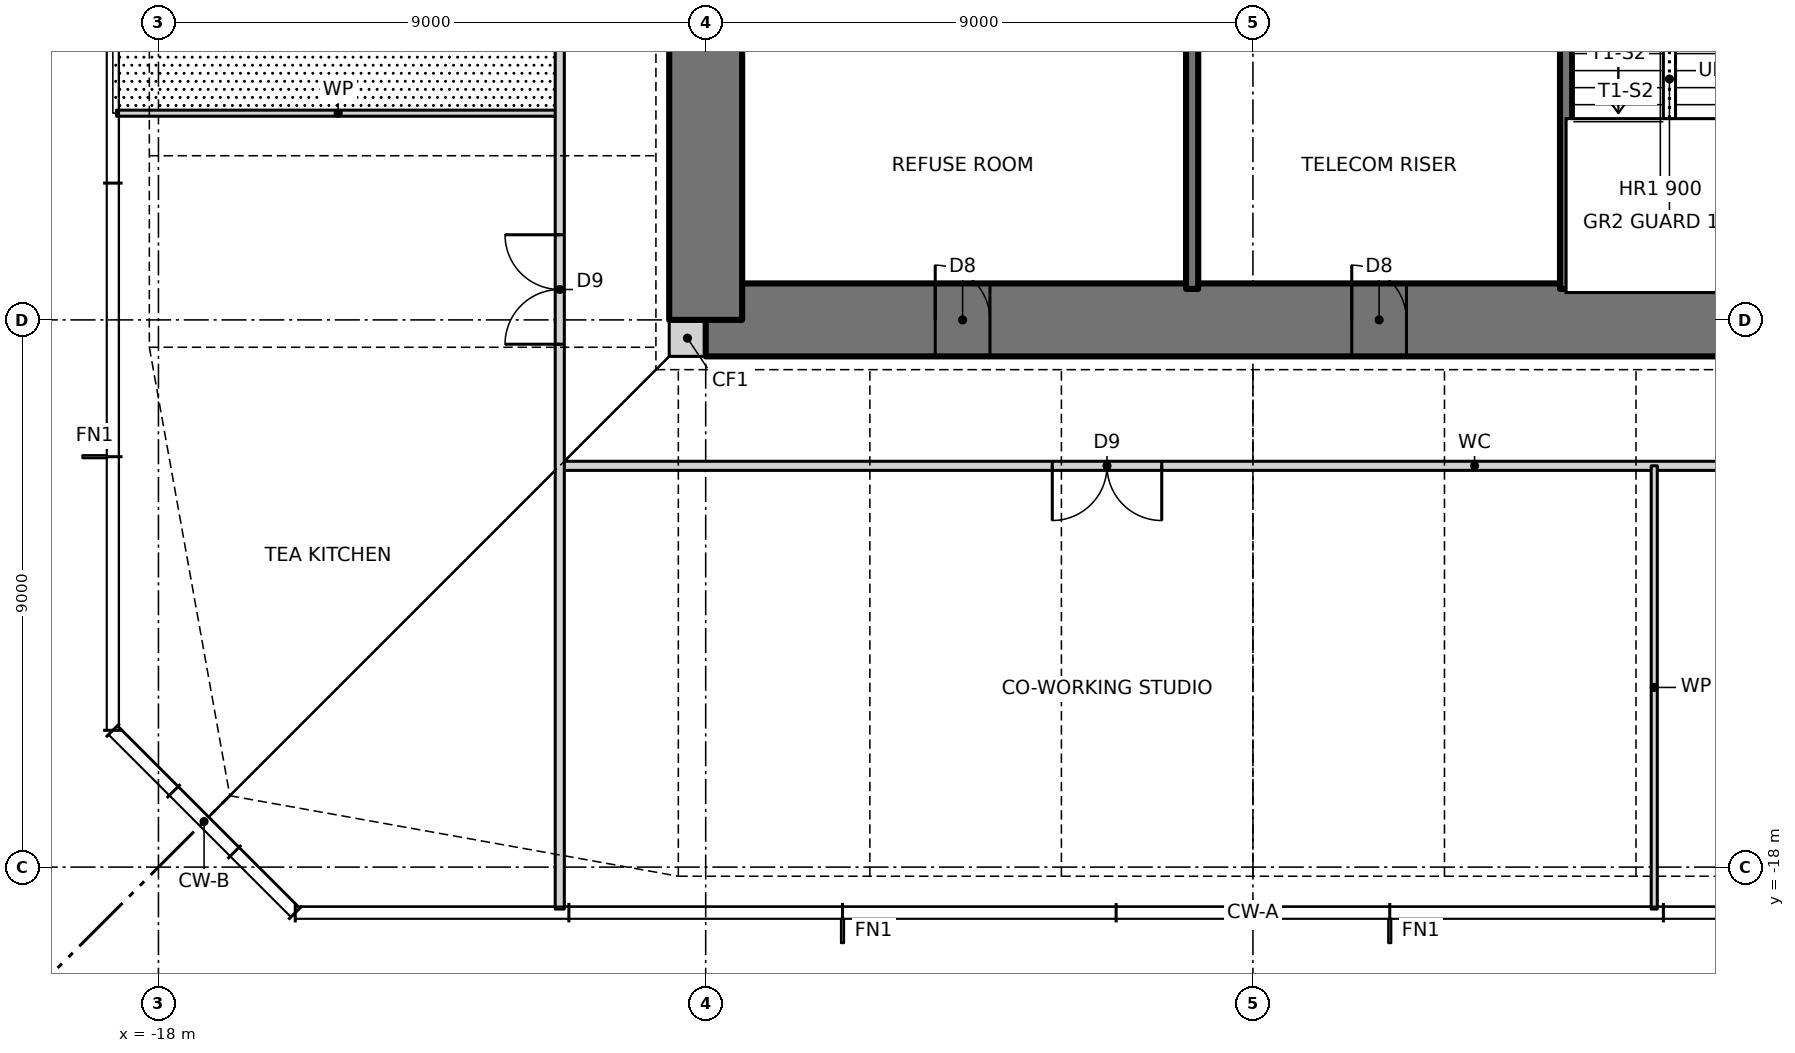
"""IFC4 building model, lengths in metres.
Left out: names, types, materials, properties, quantities, classifications, styles, units other than length and angle.
Written with IfcOpenShell. Run it as: python <this file> out.ifc"""

import sys

from ifc_helpers import new_model, si_unit, direction, frame, frame_2d, origin, place, context, subcontext, project, spatial, rectangle, extrude, element, fill, save


model = new_model("IFC4")
c1 = context("Model", 3, precision=1e-05, world=origin(), true_north=direction((0.0, 1.0)))
c2 = subcontext(c1, "Body", "Model", "MODEL_VIEW")
j1 = project(units=[si_unit("LENGTHUNIT", "METRE"), si_unit("PLANEANGLEUNIT", "RADIAN")], contexts=[c1])
p1 = place(None, origin())
s1 = spatial("IfcSite", under=j1, at=p1, CompositionType="ELEMENT")
p2 = place(p1, origin())
s2 = spatial("IfcBuilding", under=s1, at=p2, CompositionType="ELEMENT")
p3 = place(p2, frame((0.0, 0.0, 149.5)))
s3 = spatial("IfcBuildingStorey", under=s2, at=p3, CompositionType="ELEMENT", Elevation=149.5)
p4 = place(p3, frame((-9.6, -9.3, 0.0), z_axis=(0.0, 0.0, 1.0), x_axis=(1.0, 0.0, 0.0)))
e1 = element("IfcWall", 1, at=p4, inside=s3, PredefinedType="SOLIDWALL", context=c2, shape_type="SweptSolid", body=[
    extrude(rectangle(XDim=0.6, YDim=0.6, at=frame_2d((0.3, 0.0))), origin(), (0.0, 0.0, 1.0), 3.5),
])
p5 = place(p3, frame((-9.0, -9.0, 0.0), z_axis=(0.0, 0.0, 1.0), x_axis=(1.0, 0.0, 0.0)))
e2 = element("IfcWall", 2, at=p5, inside=s3, PredefinedType="SHEAR", context=c2, shape_type="SweptSolid", body=[
    extrude(rectangle(XDim=18.0, YDim=1.2, at=frame_2d((9.0, 0.0))), origin(), (0.0, 0.0, 1.0), 3.5),
])
p6 = place(p5, frame((3.775, 0.0, 0.0)))
e3 = element("IfcOpeningElement", 3, at=p6, cuts=e2, PredefinedType="OPENING", context=c2, shape_type="SweptSolid", body=[
    extrude(rectangle(XDim=0.9, YDim=2.1, at=frame_2d((0.45, 1.05))), frame((0.0, 0.61, 0.0), z_axis=(0.0, -1.0, 0.0), x_axis=(1.0, 0.0, 0.0)), (0.0, 0.0, 1.0), 1.22),
])
p7 = place(p5, frame((10.625, 0.0, 0.0)))
e4 = element("IfcOpeningElement", 4, at=p7, cuts=e2, PredefinedType="OPENING", context=c2, shape_type="SweptSolid", body=[
    extrude(rectangle(XDim=0.9, YDim=2.1, at=frame_2d((0.45, 1.05))), frame((0.0, 0.61, 0.0), z_axis=(0.0, -1.0, 0.0), x_axis=(1.0, 0.0, 0.0)), (0.0, 0.0, 1.0), 1.22),
])
p8 = place(p3, frame((-9.0, 9.0, 0.0), z_axis=(0.0, 0.0, 1.0), x_axis=(0.0, -1.0, 0.0)))
e5 = element("IfcWall", 5, at=p8, inside=s3, PredefinedType="SHEAR", context=c2, shape_type="SweptSolid", body=[
    extrude(rectangle(XDim=18.0, YDim=1.2, at=frame_2d((9.0, 0.0))), origin(), (0.0, 0.0, 1.0), 3.5),
])
p9 = place(p8, frame((8.5, 0.0, 0.0)))
e6 = element("IfcOpeningElement", 6, at=p9, cuts=e5, PredefinedType="OPENING", context=c2, shape_type="SweptSolid", body=[
    extrude(rectangle(XDim=1.0, YDim=2.1, at=frame_2d((0.5, 1.05))), frame((0.0, 0.61, 0.0), z_axis=(0.0, -1.0, 0.0), x_axis=(1.0, 0.0, 0.0)), (0.0, 0.0, 1.0), 1.22),
])
p10 = place(p3, frame((-11.4, -11.4, 0.0), z_axis=(0.0, 0.0, 1.0), x_axis=(1.0, 0.0, 0.0)))
e7 = element("IfcWall", 7, at=p10, inside=s3, PredefinedType="PARTITIONING", context=c2, shape_type="SweptSolid", body=[
    extrude(rectangle(XDim=30.09, YDim=0.15, at=frame_2d((15.045, 0.0))), origin(), (0.0, 0.0, 1.0), 3.27),
])
p11 = place(p10, frame((8.1, 0.0, 0.0)))
e8 = element("IfcOpeningElement", 8, at=p11, cuts=e7, PredefinedType="OPENING", context=c2, shape_type="SweptSolid", body=[
    extrude(rectangle(XDim=1.8, YDim=2.1, at=frame_2d((0.9, 1.05))), frame((0.0, 0.085, 0.0), z_axis=(0.0, -1.0, 0.0), x_axis=(1.0, 0.0, 0.0)), (0.0, 0.0, 1.0), 0.17),
])
p12 = place(p10, frame((19.5, 0.0, 0.0)))
e9 = element("IfcOpeningElement", 9, at=p12, cuts=e7, PredefinedType="OPENING", context=c2, shape_type="SweptSolid", body=[
    extrude(rectangle(XDim=1.8, YDim=2.1, at=frame_2d((0.9, 1.05))), frame((0.0, 0.085, 0.0), z_axis=(0.0, -1.0, 0.0), x_axis=(1.0, 0.0, 0.0)), (0.0, 0.0, 1.0), 0.17),
])
for number, where, z_axis, x_axis in (
    (10, (-18.69, -5.6, 0.0), (0.0, 0.0, 1.0), (1.0, 0.0, 0.0)),
    (11, (6.6, -18.69, 0.0), (0.0, 0.0, 1.0), (0.0, 1.0, 0.0)),
):
    element("IfcWall", number, at=place(p3, frame(where, z_axis=z_axis, x_axis=x_axis)), inside=s3, PredefinedType="PARTITIONING", context=c2, shape_type="SweptSolid", body=[
        extrude(rectangle(XDim=7.29, YDim=0.1, at=frame_2d((3.645, 0.0))), origin(), (0.0, 0.0, 1.0), 3.27),
    ])
p13 = place(p3, frame((5.15, -8.49, 0.0), z_axis=(0.0, 0.0, 1.0), x_axis=(0.0, 1.0, 0.0)))
e12 = element("IfcWall", 12, at=p13, inside=s3, PredefinedType="SOLIDWALL", context=c2, shape_type="SweptSolid", body=[
    extrude(rectangle(XDim=13.09, YDim=0.2, at=frame_2d((6.545, 0.0))), origin(), (0.0, 0.0, 1.0), 3.5),
])
p14 = place(p13, frame((7.89, 0.0, 0.0)))
e13 = element("IfcOpeningElement", 13, at=p14, cuts=e12, PredefinedType="OPENING", context=c2, shape_type="SweptSolid", body=[
    extrude(rectangle(XDim=1.2, YDim=2.1, at=frame_2d((0.6, 1.05))), frame((0.0, 0.11, 0.0), z_axis=(0.0, -1.0, 0.0), x_axis=(1.0, 0.0, 0.0)), (0.0, 0.0, 1.0), 0.22),
])
p15 = place(p3, frame((-1.0, -8.49, 0.0), z_axis=(0.0, 0.0, 1.0), x_axis=(0.0, 1.0, 0.0)))
e14 = element("IfcWall", 14, at=p15, inside=s3, PredefinedType="SOLIDWALL", context=c2, shape_type="SweptSolid", body=[
    extrude(rectangle(XDim=4.09, YDim=0.2, at=frame_2d((2.045, 0.0))), origin(), (0.0, 0.0, 1.0), 3.5),
])
p16 = place(p3, frame((-11.4, -18.69, 0.0), z_axis=(0.0, 0.0, 1.0), x_axis=(0.0, 1.0, 0.0)))
e15 = element("IfcWall", 15, at=p16, inside=s3, PredefinedType="PARTITIONING", context=c2, shape_type="SweptSolid", body=[
    extrude(rectangle(XDim=30.09, YDim=0.15, at=frame_2d((15.045, 0.0))), origin(), (0.0, 0.0, 1.0), 3.27),
])
p17 = place(p16, frame((20.69, 0.0, 0.0)))
e16 = element("IfcOpeningElement", 16, at=p17, cuts=e15, PredefinedType="OPENING", context=c2, shape_type="SweptSolid", body=[
    extrude(rectangle(XDim=1.8, YDim=2.1, at=frame_2d((0.9, 1.05))), frame((0.0, 0.085, 0.0), z_axis=(0.0, -1.0, 0.0), x_axis=(1.0, 0.0, 0.0)), (0.0, 0.0, 1.0), 0.17),
])
p18 = place(p16, frame((9.29, 0.0, 0.0)))
e17 = element("IfcOpeningElement", 17, at=p18, cuts=e15, PredefinedType="OPENING", context=c2, shape_type="SweptSolid", body=[
    extrude(rectangle(XDim=1.8, YDim=2.1, at=frame_2d((0.9, 1.05))), frame((0.0, 0.085, 0.0), z_axis=(0.0, -1.0, 0.0), x_axis=(1.0, 0.0, 0.0)), (0.0, 0.0, 1.0), 0.17),
])
p19 = place(p11, frame((1.8, 0.0, 0.0), z_axis=(0.0, 0.0, 1.0), x_axis=(-1.0, 0.0, 0.0)))
e18 = element("IfcDoor", 18, at=p19, inside=s3, OperationType="DOUBLE_DOOR_SINGLE_SWING", PredefinedType="DOOR", context=c2, shape_type="SweptSolid", body=[
    extrude(rectangle(XDim=1.8, YDim=2.1, at=frame_2d((0.9, 1.05))), frame((0.0, 0.025, 0.0), z_axis=(0.0, -1.0, 0.0), x_axis=(1.0, 0.0, 0.0)), (0.0, 0.0, 1.0), 0.05),
])
fill(e8, e18)
p20 = place(p18, origin())
e19 = element("IfcDoor", 19, at=p20, inside=s3, OperationType="DOUBLE_DOOR_SINGLE_SWING", PredefinedType="DOOR", context=c2, shape_type="SweptSolid", body=[
    extrude(rectangle(XDim=1.8, YDim=2.1, at=frame_2d((0.9, 1.05))), frame((0.0, 0.025, 0.0), z_axis=(0.0, -1.0, 0.0), x_axis=(1.0, 0.0, 0.0)), (0.0, 0.0, 1.0), 0.05),
])
fill(e17, e19)
p21 = place(p6, origin())
e20 = element("IfcDoor", 20, at=p21, inside=s3, OperationType="SINGLE_SWING_LEFT", PredefinedType="DOOR", context=c2, shape_type="SweptSolid", body=[
    extrude(rectangle(XDim=0.9, YDim=2.1, at=frame_2d((0.45, 1.05))), frame((0.0, 0.025, 0.0), z_axis=(0.0, -1.0, 0.0), x_axis=(1.0, 0.0, 0.0)), (0.0, 0.0, 1.0), 0.05),
])
fill(e3, e20)
p22 = place(p7, origin())
e21 = element("IfcDoor", 21, at=p22, inside=s3, OperationType="SINGLE_SWING_LEFT", PredefinedType="DOOR", context=c2, shape_type="SweptSolid", body=[
    extrude(rectangle(XDim=0.9, YDim=2.1, at=frame_2d((0.45, 1.05))), frame((0.0, 0.025, 0.0), z_axis=(0.0, -1.0, 0.0), x_axis=(1.0, 0.0, 0.0)), (0.0, 0.0, 1.0), 0.05),
])
fill(e4, e21)
save(model, sys.argv[1])
